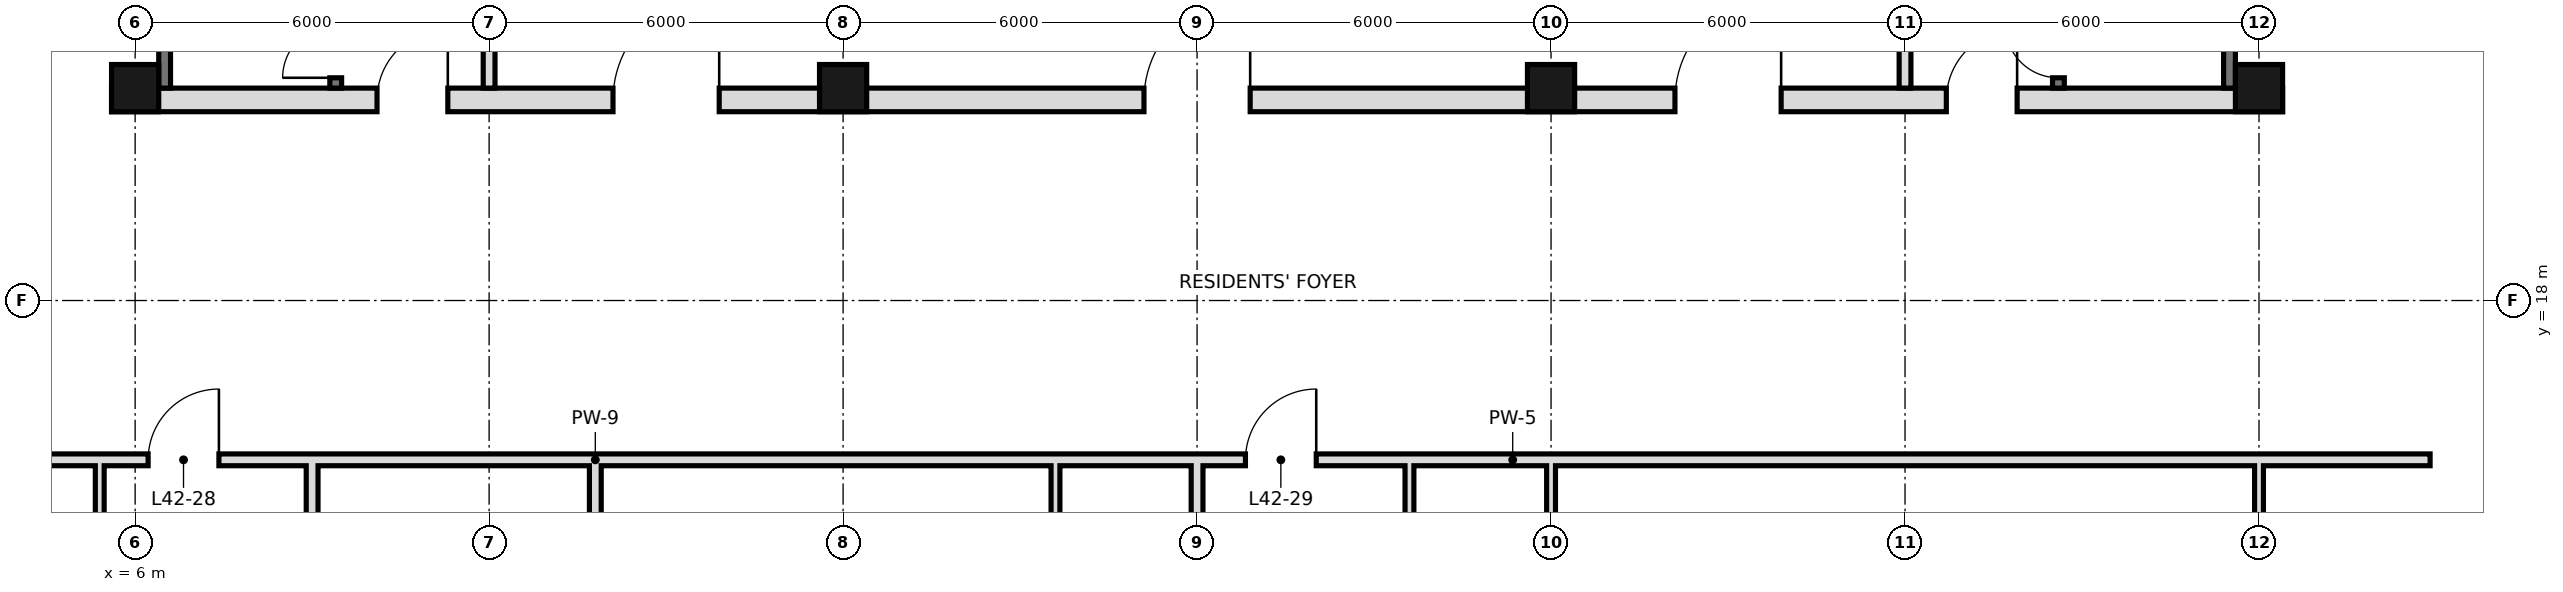
"""IFC4 building model, lengths in metres.
Left out: names, types, materials, properties, quantities, classifications, styles, units other than length and angle.
Written with IfcOpenShell. Run it as: python <this file> out.ifc"""

import sys

from ifc_helpers import new_model, si_unit, direction, frame, frame_2d, origin, origin_2d, place, context, subcontext, project, spatial, rectangle, hollow_rectangle, extrude, element, fill, save


model = new_model("IFC4")
c1 = context("Model", 3, precision=1e-05, world=origin(), true_north=direction((0.0, 1.0)))
c2 = subcontext(c1, "Body", "Model", "MODEL_VIEW")
j1 = project(units=[si_unit("LENGTHUNIT", "METRE"), si_unit("PLANEANGLEUNIT", "RADIAN")], contexts=[c1])
p1 = place(None, origin())
s1 = spatial("IfcSite", under=j1, at=p1, CompositionType="ELEMENT")
p2 = place(p1, origin())
s2 = spatial("IfcBuilding", under=s1, at=p2, CompositionType="ELEMENT")
p3 = place(p2, frame((0.0, 0.0, 181.6)))
s3 = spatial("IfcBuildingStorey", under=s2, at=p3, CompositionType="ELEMENT", Elevation=181.6)
for number, where, z_axis, x_axis in (
    (1, (6.0, 21.6, 0.0), (0.0, 0.0, 1.0), (1.0, 0.0, 0.0)),
    (2, (18.0, 21.6, 0.0), (0.0, 0.0, 1.0), (1.0, 0.0, 0.0)),
    (3, (30.0, 21.6, 0.0), (0.0, 0.0, 1.0), (1.0, 0.0, 0.0)),
    (4, (42.0, 21.6, 0.0), (0.0, 0.0, 1.0), (1.0, 0.0, 0.0)),
):
    element("IfcColumn", number, at=place(p3, frame(where, z_axis=z_axis, x_axis=x_axis)), inside=s3, PredefinedType="COLUMN", context=c2, shape_type="SweptSolid", body=[
        extrude(hollow_rectangle(XDim=0.8, YDim=0.8, WallThickness=0.045, at=origin_2d()), origin(), (0.0, 0.0, 1.0), 4.4),
    ])
p4 = place(p3, frame((13.8, 10.8, 0.0), z_axis=(0.0, 0.0, 1.0), x_axis=(0.0, 1.0, 0.0)))
e5 = element("IfcWall", 5, at=p4, inside=s3, PredefinedType="SOLIDWALL", context=c2, shape_type="SweptSolid", body=[
    extrude(rectangle(XDim=4.5, YDim=0.2, at=frame_2d((2.25, 0.0))), origin(), (0.0, 0.0, 1.0), 3.4),
])
p5 = place(p3, frame((21.6, 10.8, 0.0), z_axis=(0.0, 0.0, 1.0), x_axis=(0.0, 1.0, 0.0)))
e6 = element("IfcWall", 6, at=p5, inside=s3, PredefinedType="PARTITIONING", context=c2, shape_type="SweptSolid", body=[
    extrude(rectangle(XDim=4.5, YDim=0.15, at=frame_2d((2.25, 0.0))), origin(), (0.0, 0.0, 1.0), 4.1),
])
p6 = place(p3, frame((24.0, 0.0, 0.0), z_axis=(0.0, 0.0, 1.0), x_axis=(0.0, 1.0, 0.0)))
e7 = element("IfcWall", 7, at=p6, inside=s3, PredefinedType="SOLIDWALL", context=c2, shape_type="SweptSolid", body=[
    extrude(rectangle(XDim=15.3, YDim=0.2, at=frame_2d((7.65, 0.0))), origin(), (0.0, 0.0, 1.0), 3.4),
])
p7 = place(p3, frame((27.6, 10.8, 0.0), z_axis=(0.0, 0.0, 1.0), x_axis=(0.0, 1.0, 0.0)))
e8 = element("IfcWall", 8, at=p7, inside=s3, PredefinedType="PARTITIONING", context=c2, shape_type="SweptSolid", body=[
    extrude(rectangle(XDim=4.5, YDim=0.15, at=frame_2d((2.25, 0.0))), origin(), (0.0, 0.0, 1.0), 4.1),
])
for number, where, z_axis, x_axis in (
    (9, (30.0, 10.8, 0.0), (0.0, 0.0, 1.0), (0.0, 1.0, 0.0)),
    (10, (42.0, 10.8, 0.0), (0.0, 0.0, 1.0), (0.0, 1.0, 0.0)),
):
    element("IfcWall", number, at=place(p3, frame(where, z_axis=z_axis, x_axis=x_axis)), inside=s3, PredefinedType="PARTITIONING", context=c2, shape_type="SweptSolid", body=[
        extrude(rectangle(XDim=4.5, YDim=0.15, at=frame_2d((2.25, 0.0))), origin(), (0.0, 0.0, 1.0), 3.4),
    ])
p8 = place(p3, frame((5.4, 10.8, 0.0), z_axis=(0.0, 0.0, 1.0), x_axis=(0.0, 1.0, 0.0)))
e11 = element("IfcWall", 11, at=p8, inside=s3, PredefinedType="PARTITIONING", context=c2, shape_type="SweptSolid", body=[
    extrude(rectangle(XDim=4.5, YDim=0.15, at=frame_2d((2.25, 0.0))), origin(), (0.0, 0.0, 1.0), 4.1),
])
p9 = place(p3, frame((9.0, 10.8, 0.0), z_axis=(0.0, 0.0, 1.0), x_axis=(0.0, 1.0, 0.0)))
e12 = element("IfcWall", 12, at=p9, inside=s3, PredefinedType="SOLIDWALL", context=c2, shape_type="SweptSolid", body=[
    extrude(rectangle(XDim=4.5, YDim=0.2, at=frame_2d((2.25, 0.0))), origin(), (0.0, 0.0, 1.0), 3.4),
])
p10 = place(p3, frame((3.1, 15.3, 0.0), z_axis=(0.0, 0.0, 1.0), x_axis=(1.0, 0.0, 0.0)))
e13 = element("IfcWall", 13, at=p10, inside=s3, PredefinedType="SOLIDWALL", context=c2, shape_type="SweptSolid", body=[
    extrude(rectangle(XDim=5.9, YDim=0.2, at=frame_2d((2.95, 0.0))), origin(), (0.0, 0.0, 1.0), 3.4),
])
p11 = place(p10, frame((3.12, 0.0, 0.0)))
e14 = element("IfcOpeningElement", 14, at=p11, cuts=e13, PredefinedType="OPENING", context=c2, shape_type="SweptSolid", body=[
    extrude(rectangle(XDim=1.2, YDim=2.4, at=frame_2d((0.6, 1.2))), frame((0.0, 0.11, 0.0), z_axis=(0.0, -1.0, 0.0), x_axis=(1.0, 0.0, 0.0)), (0.0, 0.0, 1.0), 0.22),
])
p12 = place(p3, frame((13.8, 15.3, 0.0), z_axis=(0.0, 0.0, 1.0), x_axis=(1.0, 0.0, 0.0)))
e15 = element("IfcWall", 15, at=p12, inside=s3, PredefinedType="SOLIDWALL", context=c2, shape_type="SweptSolid", body=[
    extrude(rectangle(XDim=31.1, YDim=0.2, at=frame_2d((15.55, 0.0))), origin(), (0.0, 0.0, 1.0), 3.4),
])
p13 = place(p12, frame((11.02, 0.0, 0.0)))
e16 = element("IfcOpeningElement", 16, at=p13, cuts=e15, PredefinedType="OPENING", context=c2, shape_type="SweptSolid", body=[
    extrude(rectangle(XDim=1.2, YDim=2.4, at=frame_2d((0.6, 1.2))), frame((0.0, 0.11, 0.0), z_axis=(0.0, -1.0, 0.0), x_axis=(1.0, 0.0, 0.0)), (0.0, 0.0, 1.0), 0.22),
])
p14 = place(p3, frame((9.0, 15.3, 0.0), z_axis=(0.0, 0.0, 1.0), x_axis=(1.0, 0.0, 0.0)))
e17 = element("IfcWall", 17, at=p14, inside=s3, PredefinedType="SOLIDWALL", context=c2, shape_type="SweptSolid", body=[
    extrude(rectangle(XDim=4.8, YDim=0.2, at=frame_2d((2.4, 0.0))), origin(), (0.0, 0.0, 1.0), 4.1),
])
for number, where, z_axis, x_axis in (
    (18, (6.5, 21.6, 0.0), (0.0, 0.0, 1.0), (0.0, 1.0, 0.0)),
    (19, (41.5, 21.6, 0.0), (0.0, 0.0, 1.0), (0.0, 1.0, 0.0)),
):
    element("IfcWall", number, at=place(p3, frame(where, z_axis=z_axis, x_axis=x_axis)), inside=s3, PredefinedType="SOLIDWALL", context=c2, shape_type="SweptSolid", body=[
        extrude(rectangle(XDim=23.5, YDim=0.2, at=frame_2d((11.75, 0.0))), origin(), (0.0, 0.0, 1.0), 4.1),
    ])
p15 = place(p3, frame((5.6, 21.4, 0.0), z_axis=(0.0, 0.0, 1.0), x_axis=(1.0, 0.0, 0.0)))
e20 = element("IfcWall", 20, at=p15, inside=s3, PredefinedType="SOLIDWALL", context=c2, shape_type="SweptSolid", body=[
    extrude(rectangle(XDim=36.8, YDim=0.4, at=frame_2d((18.4, 0.0))), origin(), (0.0, 0.0, 1.0), 4.1),
])
p16 = place(p15, frame((8.5, 0.0, 0.0)))
e21 = element("IfcOpeningElement", 21, at=p16, cuts=e20, PredefinedType="OPENING", context=c2, shape_type="SweptSolid", body=[
    extrude(rectangle(XDim=1.8, YDim=2.1, at=frame_2d((0.9, 1.05))), frame((0.0, 0.21, 0.0), z_axis=(0.0, -1.0, 0.0), x_axis=(1.0, 0.0, 0.0)), (0.0, 0.0, 1.0), 0.42),
])
p17 = place(p15, frame((17.5, 0.0, 0.0)))
e22 = element("IfcOpeningElement", 22, at=p17, cuts=e20, PredefinedType="OPENING", context=c2, shape_type="SweptSolid", body=[
    extrude(rectangle(XDim=1.8, YDim=2.1, at=frame_2d((0.9, 1.05))), frame((0.0, 0.21, 0.0), z_axis=(0.0, -1.0, 0.0), x_axis=(1.0, 0.0, 0.0)), (0.0, 0.0, 1.0), 0.42),
])
p18 = place(p15, frame((26.5, 0.0, 0.0)))
e23 = element("IfcOpeningElement", 23, at=p18, cuts=e20, PredefinedType="OPENING", context=c2, shape_type="SweptSolid", body=[
    extrude(rectangle(XDim=1.8, YDim=2.1, at=frame_2d((0.9, 1.05))), frame((0.0, 0.21, 0.0), z_axis=(0.0, -1.0, 0.0), x_axis=(1.0, 0.0, 0.0)), (0.0, 0.0, 1.0), 0.42),
])
p19 = place(p15, frame((4.5, 0.0, 0.0)))
e24 = element("IfcOpeningElement", 24, at=p19, cuts=e20, PredefinedType="OPENING", context=c2, shape_type="SweptSolid", body=[
    extrude(rectangle(XDim=1.2, YDim=2.1, at=frame_2d((0.6, 1.05))), frame((0.0, 0.21, 0.0), z_axis=(0.0, -1.0, 0.0), x_axis=(1.0, 0.0, 0.0)), (0.0, 0.0, 1.0), 0.42),
])
p20 = place(p15, frame((31.1, 0.0, 0.0)))
e25 = element("IfcOpeningElement", 25, at=p20, cuts=e20, PredefinedType="OPENING", context=c2, shape_type="SweptSolid", body=[
    extrude(rectangle(XDim=1.2, YDim=2.1, at=frame_2d((0.6, 1.05))), frame((0.0, 0.21, 0.0), z_axis=(0.0, -1.0, 0.0), x_axis=(1.0, 0.0, 0.0)), (0.0, 0.0, 1.0), 0.42),
])
for number, where, z_axis, x_axis in (
    (26, (12.0, 21.6, 0.0), (0.0, 0.0, 1.0), (0.0, 1.0, 0.0)),
    (27, (36.0, 21.6, 0.0), (0.0, 0.0, 1.0), (0.0, 1.0, 0.0)),
):
    element("IfcWall", number, at=place(p3, frame(where, z_axis=z_axis, x_axis=x_axis)), inside=s3, PredefinedType="PARTITIONING", context=c2, shape_type="SweptSolid", body=[
        extrude(rectangle(XDim=6.1, YDim=0.2, at=frame_2d((3.05, 0.0))), origin(), (0.0, 0.0, 1.0), 4.1),
    ])
p21 = place(p3, frame((38.6, 21.6, 0.0), z_axis=(0.0, 0.0, 1.0), x_axis=(0.0, 1.0, 0.0)))
e28 = element("IfcWall", 28, at=p21, inside=s3, PredefinedType="SOLIDWALL", context=c2, shape_type="SweptSolid", body=[
    extrude(rectangle(XDim=23.4, YDim=0.2, at=frame_2d((11.7, 0.0))), origin(), (0.0, 0.0, 1.0), 4.1),
])
p22 = place(p21, frame((7.0, 0.0, 0.0)))
e29 = element("IfcOpeningElement", 29, at=p22, cuts=e28, PredefinedType="OPENING", context=c2, shape_type="SweptSolid", body=[
    extrude(rectangle(XDim=1.1, YDim=2.1, at=frame_2d((0.55, 1.05))), frame((0.0, 0.11, 0.0), z_axis=(0.0, -1.0, 0.0), x_axis=(1.0, 0.0, 0.0)), (0.0, 0.0, 1.0), 0.22),
])
p23 = place(p21, frame((10.1, 0.0, 0.0)))
e30 = element("IfcOpeningElement", 30, at=p23, cuts=e28, PredefinedType="OPENING", context=c2, shape_type="SweptSolid", body=[
    extrude(rectangle(XDim=1.1, YDim=2.1, at=frame_2d((0.55, 1.05))), frame((0.0, 0.11, 0.0), z_axis=(0.0, -1.0, 0.0), x_axis=(1.0, 0.0, 0.0)), (0.0, 0.0, 1.0), 0.22),
])
p24 = place(p21, frame((13.2, 0.0, 0.0)))
e31 = element("IfcOpeningElement", 31, at=p24, cuts=e28, PredefinedType="OPENING", context=c2, shape_type="SweptSolid", body=[
    extrude(rectangle(XDim=1.1, YDim=2.1, at=frame_2d((0.55, 1.05))), frame((0.0, 0.11, 0.0), z_axis=(0.0, -1.0, 0.0), x_axis=(1.0, 0.0, 0.0)), (0.0, 0.0, 1.0), 0.22),
])
p25 = place(p21, frame((15.7, 0.0, 0.0)))
e32 = element("IfcOpeningElement", 32, at=p25, cuts=e28, PredefinedType="OPENING", context=c2, shape_type="SweptSolid", body=[
    extrude(rectangle(XDim=1.0, YDim=2.1, at=frame_2d((0.5, 1.05))), frame((0.0, 0.11, 0.0), z_axis=(0.0, -1.0, 0.0), x_axis=(1.0, 0.0, 0.0)), (0.0, 0.0, 1.0), 0.22),
])
p26 = place(p21, frame((0.175, 0.0, 0.0)))
e33 = element("IfcOpeningElement", 33, at=p26, cuts=e28, PredefinedType="OPENING", context=c2, shape_type="SweptSolid", body=[
    extrude(rectangle(XDim=0.9, YDim=2.1, at=frame_2d((0.45, 1.05))), frame((0.0, 0.11, 0.0), z_axis=(0.0, -1.0, 0.0), x_axis=(1.0, 0.0, 0.0)), (0.0, 0.0, 1.0), 0.22),
])
p27 = place(p3, frame((9.4, 21.6, 0.0), z_axis=(0.0, 0.0, 1.0), x_axis=(0.0, 1.0, 0.0)))
e34 = element("IfcWall", 34, at=p27, inside=s3, PredefinedType="SOLIDWALL", context=c2, shape_type="SweptSolid", body=[
    extrude(rectangle(XDim=23.4, YDim=0.2, at=frame_2d((11.7, 0.0))), origin(), (0.0, 0.0, 1.0), 4.1),
])
p28 = place(p27, frame((7.7, 0.0, 0.0)))
e35 = element("IfcOpeningElement", 35, at=p28, cuts=e34, PredefinedType="OPENING", context=c2, shape_type="SweptSolid", body=[
    extrude(rectangle(XDim=1.0, YDim=2.1, at=frame_2d((0.5, 1.05))), frame((0.0, 0.11, 0.0), z_axis=(0.0, -1.0, 0.0), x_axis=(1.0, 0.0, 0.0)), (0.0, 0.0, 1.0), 0.22),
])
p29 = place(p27, frame((12.35, 0.0, 0.0)))
e36 = element("IfcOpeningElement", 36, at=p29, cuts=e34, PredefinedType="OPENING", context=c2, shape_type="SweptSolid", body=[
    extrude(rectangle(XDim=1.0, YDim=2.1, at=frame_2d((0.5, 1.05))), frame((0.0, 0.11, 0.0), z_axis=(0.0, -1.0, 0.0), x_axis=(1.0, 0.0, 0.0)), (0.0, 0.0, 1.0), 0.22),
])
p30 = place(p27, frame((15.7, 0.0, 0.0)))
e37 = element("IfcOpeningElement", 37, at=p30, cuts=e34, PredefinedType="OPENING", context=c2, shape_type="SweptSolid", body=[
    extrude(rectangle(XDim=1.0, YDim=2.1, at=frame_2d((0.5, 1.05))), frame((0.0, 0.11, 0.0), z_axis=(0.0, -1.0, 0.0), x_axis=(1.0, 0.0, 0.0)), (0.0, 0.0, 1.0), 0.22),
])
p31 = place(p27, frame((0.175, 0.0, 0.0)))
e38 = element("IfcOpeningElement", 38, at=p31, cuts=e34, PredefinedType="OPENING", context=c2, shape_type="SweptSolid", body=[
    extrude(rectangle(XDim=0.9, YDim=2.1, at=frame_2d((0.45, 1.05))), frame((0.0, 0.11, 0.0), z_axis=(0.0, -1.0, 0.0), x_axis=(1.0, 0.0, 0.0)), (0.0, 0.0, 1.0), 0.22),
])
p32 = place(p11, frame((1.2, 0.0, 0.0), z_axis=(0.0, 0.0, 1.0), x_axis=(-1.0, 0.0, 0.0)))
e39 = element("IfcDoor", 39, at=p32, inside=s3, OperationType="SINGLE_SWING_LEFT", PredefinedType="DOOR", context=c2, shape_type="SweptSolid", body=[
    extrude(rectangle(XDim=1.2, YDim=2.4, at=frame_2d((0.6, 1.2))), frame((0.0, 0.025, 0.0), z_axis=(0.0, -1.0, 0.0), x_axis=(1.0, 0.0, 0.0)), (0.0, 0.0, 1.0), 0.05),
])
fill(e14, e39)
p33 = place(p13, frame((1.2, 0.0, 0.0), z_axis=(0.0, 0.0, 1.0), x_axis=(-1.0, 0.0, 0.0)))
e40 = element("IfcDoor", 40, at=p33, inside=s3, OperationType="SINGLE_SWING_LEFT", PredefinedType="DOOR", context=c2, shape_type="SweptSolid", body=[
    extrude(rectangle(XDim=1.2, YDim=2.4, at=frame_2d((0.6, 1.2))), frame((0.0, 0.025, 0.0), z_axis=(0.0, -1.0, 0.0), x_axis=(1.0, 0.0, 0.0)), (0.0, 0.0, 1.0), 0.05),
])
fill(e16, e40)
p34 = place(p16, frame((1.8, 0.0, 0.0), z_axis=(0.0, 0.0, 1.0), x_axis=(-1.0, 0.0, 0.0)))
e41 = element("IfcDoor", 41, at=p34, inside=s3, OperationType="SINGLE_SWING_LEFT", PredefinedType="DOOR", context=c2, shape_type="SweptSolid", body=[
    extrude(rectangle(XDim=1.8, YDim=2.1, at=frame_2d((0.9, 1.05))), frame((0.0, 0.025, 0.0), z_axis=(0.0, -1.0, 0.0), x_axis=(1.0, 0.0, 0.0)), (0.0, 0.0, 1.0), 0.05),
])
fill(e21, e41)
p35 = place(p17, frame((1.8, 0.0, 0.0), z_axis=(0.0, 0.0, 1.0), x_axis=(-1.0, 0.0, 0.0)))
e42 = element("IfcDoor", 42, at=p35, inside=s3, OperationType="SINGLE_SWING_LEFT", PredefinedType="DOOR", context=c2, shape_type="SweptSolid", body=[
    extrude(rectangle(XDim=1.8, YDim=2.1, at=frame_2d((0.9, 1.05))), frame((0.0, 0.025, 0.0), z_axis=(0.0, -1.0, 0.0), x_axis=(1.0, 0.0, 0.0)), (0.0, 0.0, 1.0), 0.05),
])
fill(e22, e42)
p36 = place(p18, frame((1.8, 0.0, 0.0), z_axis=(0.0, 0.0, 1.0), x_axis=(-1.0, 0.0, 0.0)))
e43 = element("IfcDoor", 43, at=p36, inside=s3, OperationType="SINGLE_SWING_LEFT", PredefinedType="DOOR", context=c2, shape_type="SweptSolid", body=[
    extrude(rectangle(XDim=1.8, YDim=2.1, at=frame_2d((0.9, 1.05))), frame((0.0, 0.025, 0.0), z_axis=(0.0, -1.0, 0.0), x_axis=(1.0, 0.0, 0.0)), (0.0, 0.0, 1.0), 0.05),
])
fill(e23, e43)
p37 = place(p19, frame((1.2, 0.0, 0.0), z_axis=(0.0, 0.0, 1.0), x_axis=(-1.0, 0.0, 0.0)))
e44 = element("IfcDoor", 44, at=p37, inside=s3, OperationType="SINGLE_SWING_LEFT", PredefinedType="DOOR", context=c2, shape_type="SweptSolid", body=[
    extrude(rectangle(XDim=1.2, YDim=2.1, at=frame_2d((0.6, 1.05))), frame((0.0, 0.025, 0.0), z_axis=(0.0, -1.0, 0.0), x_axis=(1.0, 0.0, 0.0)), (0.0, 0.0, 1.0), 0.05),
])
fill(e24, e44)
p38 = place(p20, frame((1.2, 0.0, 0.0), z_axis=(0.0, 0.0, 1.0), x_axis=(-1.0, 0.0, 0.0)))
e45 = element("IfcDoor", 45, at=p38, inside=s3, OperationType="SINGLE_SWING_LEFT", PredefinedType="DOOR", context=c2, shape_type="SweptSolid", body=[
    extrude(rectangle(XDim=1.2, YDim=2.1, at=frame_2d((0.6, 1.05))), frame((0.0, 0.025, 0.0), z_axis=(0.0, -1.0, 0.0), x_axis=(1.0, 0.0, 0.0)), (0.0, 0.0, 1.0), 0.05),
])
fill(e25, e45)
p39 = place(p31, origin())
e46 = element("IfcDoor", 46, at=p39, inside=s3, OperationType="SINGLE_SWING_LEFT", PredefinedType="DOOR", context=c2, shape_type="SweptSolid", body=[
    extrude(rectangle(XDim=0.9, YDim=2.1, at=frame_2d((0.45, 1.05))), frame((0.0, 0.025, 0.0), z_axis=(0.0, -1.0, 0.0), x_axis=(1.0, 0.0, 0.0)), (0.0, 0.0, 1.0), 0.05),
])
fill(e38, e46)
p40 = place(p26, frame((0.9, 0.0, 0.0), z_axis=(0.0, 0.0, 1.0), x_axis=(-1.0, 0.0, 0.0)))
e47 = element("IfcDoor", 47, at=p40, inside=s3, OperationType="SINGLE_SWING_LEFT", PredefinedType="DOOR", context=c2, shape_type="SweptSolid", body=[
    extrude(rectangle(XDim=0.9, YDim=2.1, at=frame_2d((0.45, 1.05))), frame((0.0, 0.025, 0.0), z_axis=(0.0, -1.0, 0.0), x_axis=(1.0, 0.0, 0.0)), (0.0, 0.0, 1.0), 0.05),
])
fill(e33, e47)
save(model, sys.argv[1])
